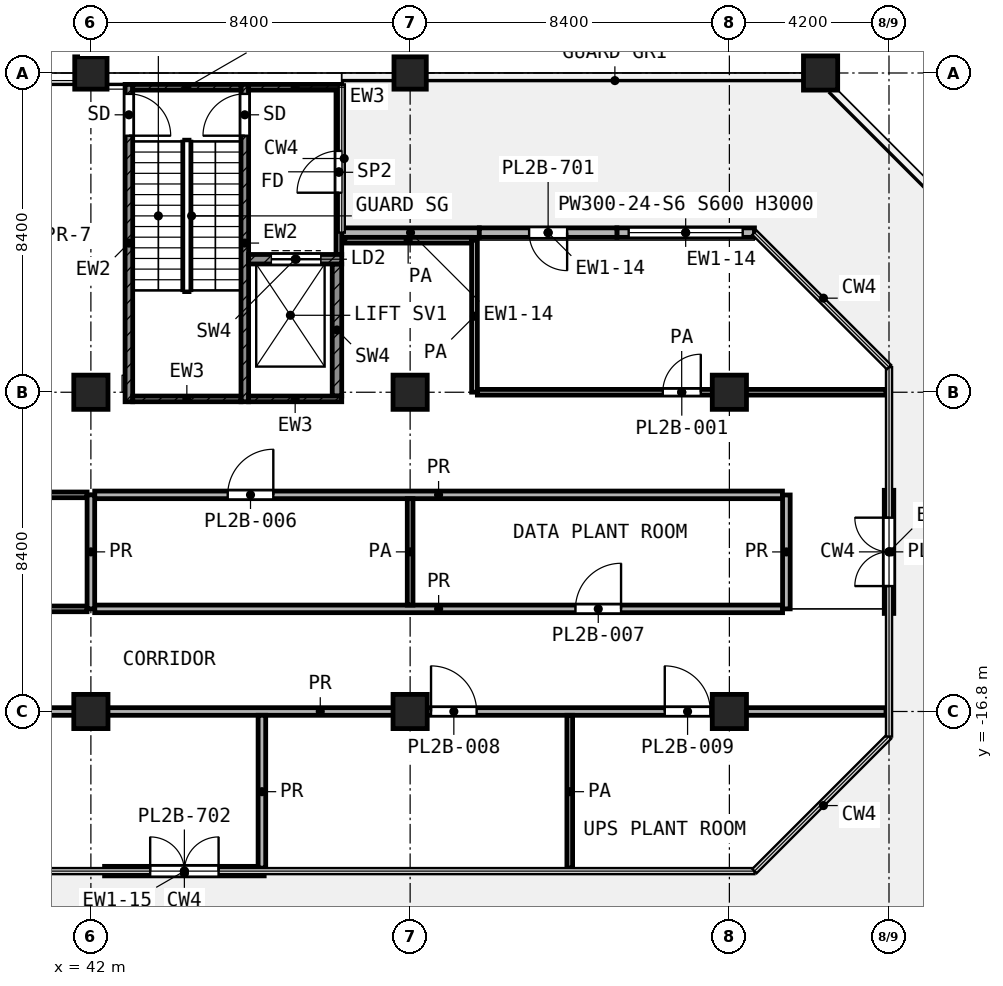
"""IFC4 building model, lengths in metres.
Left out: names, types, materials, properties, quantities, classifications, styles, units other than length and angle.
Written with IfcOpenShell. Run it as: python <this file> out.ifc"""

import sys

from ifc_helpers import new_model, si_unit, direction, frame, frame_2d, origin, origin_2d, place, context, subcontext, project, spatial, rectangle, extrude, element, fill, save


model = new_model("IFC4")
c1 = context("Model", 3, precision=1e-05, world=origin(), true_north=direction((0.0, 1.0)))
c2 = subcontext(c1, "Body", "Model", "MODEL_VIEW")
j1 = project(units=[si_unit("LENGTHUNIT", "METRE"), si_unit("PLANEANGLEUNIT", "RADIAN")], contexts=[c1])
p1 = place(None, origin())
s1 = spatial("IfcSite", under=j1, at=p1, CompositionType="ELEMENT")
p2 = place(p1, origin())
s2 = spatial("IfcBuilding", under=s1, at=p2, CompositionType="ELEMENT")
p3 = place(p2, frame((0.0, 0.0, 213.0)))
s3 = spatial("IfcBuildingStorey", under=s2, at=p3, CompositionType="ELEMENT", Elevation=213.0)
for number, where, z_axis, x_axis in (
    (1, (42.0, 0.0, 0.0), (0.0, 0.0, 1.0), (1.0, 0.0, 0.0)),
    (2, (50.4, 0.0, 0.0), (0.0, 0.0, 1.0), (1.0, 0.0, 0.0)),
):
    element("IfcColumn", number, at=place(p3, frame(where, z_axis=z_axis, x_axis=x_axis)), inside=s3, PredefinedType="COLUMN", context=c2, shape_type="SweptSolid", body=[
        extrude(rectangle(XDim=0.85, YDim=0.85, at=origin_2d()), origin(), (0.0, 0.0, 1.0), 5.0),
    ])
for number, where, z_axis, x_axis in (
    (3, (61.2, 0.0, 0.0), (0.0, 0.0, 1.0), (1.0, 0.0, 0.0)),
    (4, (42.0, -8.4, 0.0), (0.0, 0.0, 1.0), (1.0, 0.0, 0.0)),
    (5, (50.4, -8.4, 0.0), (0.0, 0.0, 1.0), (1.0, 0.0, 0.0)),
    (6, (58.8, -8.4, 0.0), (0.0, 0.0, 1.0), (1.0, 0.0, 0.0)),
    (7, (42.0, -16.8, 0.0), (0.0, 0.0, 1.0), (1.0, 0.0, 0.0)),
    (8, (50.4, -16.8, 0.0), (0.0, 0.0, 1.0), (1.0, 0.0, 0.0)),
    (9, (58.8, -16.8, 0.0), (0.0, 0.0, 1.0), (1.0, 0.0, 0.0)),
):
    element("IfcColumn", number, at=place(p3, frame(where, z_axis=z_axis, x_axis=x_axis)), inside=s3, PredefinedType="COLUMN", context=c2, shape_type="SweptSolid", body=[
        extrude(rectangle(XDim=0.9, YDim=0.9, at=origin_2d()), origin(), (0.0, 0.0, 1.0), 5.0),
    ])
p4 = place(p3, frame((42.36, -21.0, 0.0), z_axis=(0.0, 0.0, 1.0), x_axis=(1.0, 0.0, 0.0)))
e10 = element("IfcWall", 10, at=p4, inside=s3, PredefinedType="SOLIDWALL", context=c2, shape_type="SweptSolid", body=[
    extrude(rectangle(XDim=4.2, YDim=0.25, at=frame_2d((2.1, 0.0))), origin(), (0.0, 0.0, 1.0), 4.24),
])
p5 = place(p4, frame((1.2, 0.0, 0.0)))
e11 = element("IfcOpeningElement", 11, at=p5, cuts=e10, PredefinedType="OPENING", context=c2, shape_type="SweptSolid", body=[
    extrude(rectangle(XDim=1.8, YDim=2.1, at=frame_2d((0.9, 1.05))), frame((0.0, 0.135, 0.0), z_axis=(0.0, -1.0, 0.0), x_axis=(1.0, 0.0, 0.0)), (0.0, 0.0, 1.0), 0.27),
])
p6 = place(p3, frame((63.001, -14.22, 0.0), z_axis=(0.0, 0.0, 1.0), x_axis=(0.0, 1.0, 0.0)))
e12 = element("IfcWall", 12, at=p6, inside=s3, PredefinedType="SOLIDWALL", context=c2, shape_type="SweptSolid", body=[
    extrude(rectangle(XDim=3.24, YDim=0.25, at=frame_2d((1.62, 0.0))), origin(), (0.0, 0.0, 1.0), 4.24),
])
p7 = place(p6, frame((0.72, 0.0, 0.0)))
e13 = element("IfcOpeningElement", 13, at=p7, cuts=e12, PredefinedType="OPENING", context=c2, shape_type="SweptSolid", body=[
    extrude(rectangle(XDim=1.8, YDim=2.1, at=frame_2d((0.9, 1.05))), frame((0.0, 0.135, 0.0), z_axis=(0.0, -1.0, 0.0), x_axis=(1.0, 0.0, 0.0)), (0.0, 0.0, 1.0), 0.27),
])
p8 = place(p3, frame((59.46, -4.2, 0.0), z_axis=(0.0, 0.0, 1.0), x_axis=(-1.0, 0.0, 0.0)))
e14 = element("IfcWall", 14, at=p8, inside=s3, PredefinedType="SOLIDWALL", context=c2, shape_type="SweptSolid", body=[
    extrude(rectangle(XDim=3.62, YDim=0.25, at=frame_2d((1.81, 0.0))), origin(), (0.0, 0.0, 1.0), 4.4),
])
p9 = place(p8, frame((0.31, 0.0, 0.6)))
e15 = element("IfcOpeningElement", 15, at=p9, cuts=e14, PredefinedType="OPENING", context=c2, shape_type="SweptSolid", body=[
    extrude(rectangle(XDim=3.0, YDim=2.4, at=frame_2d((1.5, 1.2))), frame((0.0, 0.135, 0.0), z_axis=(0.0, -1.0, 0.0), x_axis=(1.0, 0.0, 0.0)), (0.0, 0.0, 1.0), 0.27),
])
p10 = place(p3, frame((55.84, -4.2, 0.0), z_axis=(0.0, 0.0, 1.0), x_axis=(-1.0, 0.0, 0.0)))
e16 = element("IfcWall", 16, at=p10, inside=s3, PredefinedType="SOLIDWALL", context=c2, shape_type="SweptSolid", body=[
    extrude(rectangle(XDim=3.62, YDim=0.25, at=frame_2d((1.81, 0.0))), origin(), (0.0, 0.0, 1.0), 4.4),
])
p11 = place(p10, frame((1.309, 0.0, 0.0)))
e17 = element("IfcOpeningElement", 17, at=p11, cuts=e16, PredefinedType="OPENING", context=c2, shape_type="SweptSolid", body=[
    extrude(rectangle(XDim=1.0, YDim=2.1, at=frame_2d((0.5, 1.05))), frame((0.0, 0.135, 0.0), z_axis=(0.0, -1.0, 0.0), x_axis=(1.0, 0.0, 0.0)), (0.0, 0.0, 1.0), 0.27),
])
p12 = place(p3, frame((52.221, -4.2, 0.0), z_axis=(0.0, 0.0, 1.0), x_axis=(-1.0, 0.0, 0.0)))
e18 = element("IfcWall", 18, at=p12, inside=s3, PredefinedType="SOLIDWALL", context=c2, shape_type="SweptSolid", body=[
    extrude(rectangle(XDim=3.62, YDim=0.25, at=frame_2d((1.81, 0.0))), origin(), (0.0, 0.0, 1.0), 4.4),
])
p13 = place(p3, frame((43.0, -8.65, 0.0), z_axis=(0.0, 0.0, 1.0), x_axis=(0.0, 1.0, 0.0)))
e19 = element("IfcWall", 19, at=p13, inside=s3, PredefinedType="SHEAR", context=c2, shape_type="SweptSolid", body=[
    extrude(rectangle(XDim=8.35, YDim=0.2, at=frame_2d((4.175, 0.0))), origin(), (0.0, 0.0, 1.0), 4.4),
])
p14 = place(p13, frame((7.0, 0.0, 0.0)))
e20 = element("IfcOpeningElement", 20, at=p14, cuts=e19, PredefinedType="OPENING", context=c2, shape_type="SweptSolid", body=[
    extrude(rectangle(XDim=1.1, YDim=2.1, at=frame_2d((0.55, 1.05))), frame((0.0, 0.11, 0.0), z_axis=(0.0, -1.0, 0.0), x_axis=(1.0, 0.0, 0.0)), (0.0, 0.0, 1.0), 0.22),
])
p15 = place(p3, frame((46.05, -8.65, 0.0), z_axis=(0.0, 0.0, 1.0), x_axis=(0.0, 1.0, 0.0)))
e21 = element("IfcWall", 21, at=p15, inside=s3, PredefinedType="SHEAR", context=c2, shape_type="SweptSolid", body=[
    extrude(rectangle(XDim=8.35, YDim=0.2, at=frame_2d((4.175, 0.0))), origin(), (0.0, 0.0, 1.0), 4.4),
])
p16 = place(p15, frame((7.0, 0.0, 0.0)))
e22 = element("IfcOpeningElement", 22, at=p16, cuts=e21, PredefinedType="OPENING", context=c2, shape_type="SweptSolid", body=[
    extrude(rectangle(XDim=1.1, YDim=2.1, at=frame_2d((0.55, 1.05))), frame((0.0, 0.11, 0.0), z_axis=(0.0, -1.0, 0.0), x_axis=(1.0, 0.0, 0.0)), (0.0, 0.0, 1.0), 0.22),
])
p17 = place(p3, frame((43.1, -0.375, 0.0), z_axis=(0.0, 0.0, 1.0), x_axis=(1.0, 0.0, 0.0)))
e23 = element("IfcWall", 23, at=p17, inside=s3, PredefinedType="SHEAR", context=c2, shape_type="SweptSolid", body=[
    extrude(rectangle(XDim=2.85, YDim=0.15, at=frame_2d((1.425, 0.0))), origin(), (0.0, 0.0, 1.0), 4.4),
])
p18 = place(p3, frame((46.15, -0.375, 0.0), z_axis=(0.0, 0.0, 1.0), x_axis=(1.0, 0.0, 0.0)))
e24 = element("IfcWall", 24, at=p18, inside=s3, PredefinedType="SHEAR", context=c2, shape_type="SweptSolid", body=[
    extrude(rectangle(XDim=2.45, YDim=0.15, at=frame_2d((1.225, 0.0))), origin(), (0.0, 0.0, 1.0), 4.4),
])
p19 = place(p3, frame((43.1, -8.575, 0.0), z_axis=(0.0, 0.0, 1.0), x_axis=(1.0, 0.0, 0.0)))
e25 = element("IfcWall", 25, at=p19, inside=s3, PredefinedType="SHEAR", context=c2, shape_type="SweptSolid", body=[
    extrude(rectangle(XDim=2.85, YDim=0.15, at=frame_2d((1.425, 0.0))), origin(), (0.0, 0.0, 1.0), 4.4),
])
p20 = place(p3, frame((46.15, -8.575, 0.0), z_axis=(0.0, 0.0, 1.0), x_axis=(1.0, 0.0, 0.0)))
e26 = element("IfcWall", 26, at=p20, inside=s3, PredefinedType="SHEAR", context=c2, shape_type="SweptSolid", body=[
    extrude(rectangle(XDim=2.45, YDim=0.15, at=frame_2d((1.225, 0.0))), origin(), (0.0, 0.0, 1.0), 4.4),
])
p21 = place(p3, frame((46.15, -4.9, 0.0), z_axis=(0.0, 0.0, 1.0), x_axis=(1.0, 0.0, 0.0)))
e27 = element("IfcWall", 27, at=p21, inside=s3, PredefinedType="SHEAR", context=c2, shape_type="SweptSolid", body=[
    extrude(rectangle(XDim=2.45, YDim=0.25, at=frame_2d((1.225, 0.0))), origin(), (0.0, 0.0, 1.0), 4.4),
])
p22 = place(p21, frame((0.6, 0.0, 0.0)))
e28 = element("IfcOpeningElement", 28, at=p22, cuts=e27, PredefinedType="OPENING", context=c2, shape_type="SweptSolid", body=[
    extrude(rectangle(XDim=1.3, YDim=2.1, at=frame_2d((0.65, 1.05))), frame((0.0, 0.135, 0.0), z_axis=(0.0, -1.0, 0.0), x_axis=(1.0, 0.0, 0.0)), (0.0, 0.0, 1.0), 0.27),
])
p23 = place(p3, frame((48.475, -8.5, 0.0), z_axis=(0.0, 0.0, 1.0), x_axis=(0.0, 1.0, 0.0)))
e29 = element("IfcWall", 29, at=p23, inside=s3, PredefinedType="SHEAR", context=c2, shape_type="SweptSolid", body=[
    extrude(rectangle(XDim=3.475, YDim=0.25, at=frame_2d((1.738, 0.0))), origin(), (0.0, 0.0, 1.0), 4.4),
])
p24 = place(p3, frame((48.525, -4.775, 0.0), z_axis=(0.0, 0.0, 1.0), x_axis=(0.0, 1.0, 0.0)))
e30 = element("IfcWall", 30, at=p24, inside=s3, PredefinedType="PARTITIONING", context=c2, shape_type="SweptSolid", body=[
    extrude(rectangle(XDim=4.325, YDim=0.15, at=frame_2d((2.163, 0.0))), origin(), (0.0, 0.0, 1.0), 4.4),
])
p25 = place(p24, frame((1.625, 0.0, 0.0)))
e31 = element("IfcOpeningElement", 31, at=p25, cuts=e30, PredefinedType="OPENING", context=c2, shape_type="SweptSolid", body=[
    extrude(rectangle(XDim=1.1, YDim=2.1, at=frame_2d((0.55, 1.05))), frame((0.0, 0.085, 0.0), z_axis=(0.0, -1.0, 0.0), x_axis=(1.0, 0.0, 0.0)), (0.0, 0.0, 1.0), 0.17),
])
p26 = place(p3, frame((29.475, -14.1, 0.0), z_axis=(0.0, 0.0, 1.0), x_axis=(1.0, 0.0, 0.0)))
e32 = element("IfcWall", 32, at=p26, inside=s3, PredefinedType="PARTITIONING", context=c2, shape_type="SweptSolid", body=[
    extrude(rectangle(XDim=12.425, YDim=0.15, at=frame_2d((6.212, 0.0))), origin(), (0.0, 0.0, 1.0), 4.4),
])
p27 = place(p3, frame((29.478, -11.1, 0.0), z_axis=(0.0, 0.0, 1.0), x_axis=(1.0, 0.0, 0.0)))
e33 = element("IfcWall", 33, at=p27, inside=s3, PredefinedType="PARTITIONING", context=c2, shape_type="SweptSolid", body=[
    extrude(rectangle(XDim=12.422, YDim=0.15, at=frame_2d((6.211, 0.0))), origin(), (0.0, 0.0, 1.0), 4.4),
])
p28 = place(p27, frame((5.723, 0.0, 0.0)))
e34 = element("IfcOpeningElement", 34, at=p28, cuts=e33, PredefinedType="OPENING", context=c2, shape_type="SweptSolid", body=[
    extrude(rectangle(XDim=1.0, YDim=2.1, at=frame_2d((0.5, 1.05))), frame((0.0, 0.085, 0.0), z_axis=(0.0, -1.0, 0.0), x_axis=(1.0, 0.0, 0.0)), (0.0, 0.0, 1.0), 0.17),
])
p29 = place(p3, frame((52.169, -8.4, 0.0), z_axis=(0.0, 0.0, 1.0), x_axis=(1.0, 0.0, 0.0)))
e35 = element("IfcWall", 35, at=p29, inside=s3, PredefinedType="PARTITIONING", context=c2, shape_type="SweptSolid", body=[
    extrude(rectangle(XDim=10.752, YDim=0.15, at=frame_2d((5.376, 0.0))), origin(), (0.0, 0.0, 1.0), 4.4),
])
p30 = place(p29, frame((4.879, 0.0, 0.0)))
e36 = element("IfcOpeningElement", 36, at=p30, cuts=e35, PredefinedType="OPENING", context=c2, shape_type="SweptSolid", body=[
    extrude(rectangle(XDim=1.0, YDim=2.1, at=frame_2d((0.5, 1.05))), frame((0.0, 0.085, 0.0), z_axis=(0.0, -1.0, 0.0), x_axis=(1.0, 0.0, 0.0)), (0.0, 0.0, 1.0), 0.17),
])
p31 = place(p3, frame((48.68, -4.4, 0.0), z_axis=(0.0, 0.0, 1.0), x_axis=(1.0, 0.0, 0.0)))
e37 = element("IfcWall", 37, at=p31, inside=s3, PredefinedType="PARTITIONING", context=c2, shape_type="SweptSolid", body=[
    extrude(rectangle(XDim=3.336, YDim=0.15, at=frame_2d((1.668, 0.0))), origin(), (0.0, 0.0, 1.0), 4.4),
])
p32 = place(p3, frame((50.4, -14.0, 0.0), z_axis=(0.0, 0.0, 1.0), x_axis=(0.0, 1.0, 0.0)))
e38 = element("IfcWall", 38, at=p32, inside=s3, PredefinedType="PARTITIONING", context=c2, shape_type="SweptSolid", body=[
    extrude(rectangle(XDim=2.8, YDim=0.15, at=frame_2d((1.4, 0.0))), origin(), (0.0, 0.0, 1.0), 4.4),
])
p33 = place(p3, frame((52.093, -8.398, 0.0), z_axis=(0.0, 0.0, 1.0), x_axis=(0.0, 1.0, 0.0)))
e39 = element("IfcWall", 39, at=p33, inside=s3, PredefinedType="PARTITIONING", context=c2, shape_type="SweptSolid", body=[
    extrude(rectangle(XDim=3.997, YDim=0.15, at=frame_2d((1.999, 0.0))), origin(), (0.0, 0.0, 1.0), 4.4),
])
p34 = place(p3, frame((54.6, -20.92, 0.0), z_axis=(0.0, 0.0, 1.0), x_axis=(0.0, 1.0, 0.0)))
e40 = element("IfcWall", 40, at=p34, inside=s3, PredefinedType="PARTITIONING", context=c2, shape_type="SweptSolid", body=[
    extrude(rectangle(XDim=4.02, YDim=0.15, at=frame_2d((2.01, 0.0))), origin(), (0.0, 0.0, 1.0), 4.4),
])
p35 = place(p3, frame((33.15, -16.8, 0.0), z_axis=(0.0, 0.0, 1.0), x_axis=(1.0, 0.0, 0.0)))
e41 = element("IfcWall", 41, at=p35, inside=s3, PredefinedType="PARTITIONING", context=c2, shape_type="SweptSolid", body=[
    extrude(rectangle(XDim=29.771, YDim=0.2, at=frame_2d((14.885, 0.0))), origin(), (0.0, 0.0, 1.0), 4.4),
])
p36 = place(p35, frame((4.2, 0.0, 0.0)))
e42 = element("IfcOpeningElement", 42, at=p36, cuts=e41, PredefinedType="OPENING", context=c2, shape_type="SweptSolid", body=[
    extrude(rectangle(XDim=1.2, YDim=2.1, at=frame_2d((0.6, 1.05))), frame((0.0, 0.11, 0.0), z_axis=(0.0, -1.0, 0.0), x_axis=(1.0, 0.0, 0.0)), (0.0, 0.0, 1.0), 0.22),
])
p37 = place(p35, frame((17.8, 0.0, 0.0)))
e43 = element("IfcOpeningElement", 43, at=p37, cuts=e41, PredefinedType="OPENING", context=c2, shape_type="SweptSolid", body=[
    extrude(rectangle(XDim=1.2, YDim=2.1, at=frame_2d((0.6, 1.05))), frame((0.0, 0.11, 0.0), z_axis=(0.0, -1.0, 0.0), x_axis=(1.0, 0.0, 0.0)), (0.0, 0.0, 1.0), 0.22),
])
p38 = place(p35, frame((23.95, 0.0, 0.0)))
e44 = element("IfcOpeningElement", 44, at=p38, cuts=e41, PredefinedType="OPENING", context=c2, shape_type="SweptSolid", body=[
    extrude(rectangle(XDim=1.2, YDim=2.1, at=frame_2d((0.6, 1.05))), frame((0.0, 0.11, 0.0), z_axis=(0.0, -1.0, 0.0), x_axis=(1.0, 0.0, 0.0)), (0.0, 0.0, 1.0), 0.22),
])
p39 = place(p3, frame((42.1, -14.1, 0.0), z_axis=(0.0, 0.0, 1.0), x_axis=(1.0, 0.0, 0.0)))
e45 = element("IfcWall", 45, at=p39, inside=s3, PredefinedType="PARTITIONING", context=c2, shape_type="SweptSolid", body=[
    extrude(rectangle(XDim=18.1, YDim=0.2, at=frame_2d((9.05, 0.0))), origin(), (0.0, 0.0, 1.0), 4.4),
])
p40 = place(p39, frame((12.65, 0.0, 0.0)))
e46 = element("IfcOpeningElement", 46, at=p40, cuts=e45, PredefinedType="OPENING", context=c2, shape_type="SweptSolid", body=[
    extrude(rectangle(XDim=1.2, YDim=2.1, at=frame_2d((0.6, 1.05))), frame((0.0, 0.11, 0.0), z_axis=(0.0, -1.0, 0.0), x_axis=(1.0, 0.0, 0.0)), (0.0, 0.0, 1.0), 0.22),
])
p41 = place(p3, frame((42.1, -11.1, 0.0), z_axis=(0.0, 0.0, 1.0), x_axis=(1.0, 0.0, 0.0)))
e47 = element("IfcWall", 47, at=p41, inside=s3, PredefinedType="PARTITIONING", context=c2, shape_type="SweptSolid", body=[
    extrude(rectangle(XDim=18.097, YDim=0.2, at=frame_2d((9.048, 0.0))), origin(), (0.0, 0.0, 1.0), 4.4),
])
p42 = place(p41, frame((3.5, 0.0, 0.0)))
e48 = element("IfcOpeningElement", 48, at=p42, cuts=e47, PredefinedType="OPENING", context=c2, shape_type="SweptSolid", body=[
    extrude(rectangle(XDim=1.2, YDim=2.1, at=frame_2d((0.6, 1.05))), frame((0.0, 0.11, 0.0), z_axis=(0.0, -1.0, 0.0), x_axis=(1.0, 0.0, 0.0)), (0.0, 0.0, 1.0), 0.22),
])
p43 = place(p3, frame((42.0, -14.1, 0.0), z_axis=(0.0, 0.0, 1.0), x_axis=(0.0, 1.0, 0.0)))
e49 = element("IfcWall", 49, at=p43, inside=s3, PredefinedType="PARTITIONING", context=c2, shape_type="SweptSolid", body=[
    extrude(rectangle(XDim=3.0, YDim=0.2, at=frame_2d((1.5, 0.0))), origin(), (0.0, 0.0, 1.0), 4.4),
])
p44 = place(p3, frame((46.5, -20.92, 0.0), z_axis=(0.0, 0.0, 1.0), x_axis=(0.0, 1.0, 0.0)))
e50 = element("IfcWall", 50, at=p44, inside=s3, PredefinedType="PARTITIONING", context=c2, shape_type="SweptSolid", body=[
    extrude(rectangle(XDim=4.02, YDim=0.2, at=frame_2d((2.01, 0.0))), origin(), (0.0, 0.0, 1.0), 4.4),
])
p45 = place(p3, frame((60.3, -14.1, 0.0), z_axis=(0.0, 0.0, 1.0), x_axis=(0.0, 1.0, 0.0)))
e51 = element("IfcWall", 51, at=p45, inside=s3, PredefinedType="PARTITIONING", context=c2, shape_type="SweptSolid", body=[
    extrude(rectangle(XDim=2.997, YDim=0.2, at=frame_2d((1.499, 0.0))), origin(), (0.0, 0.0, 1.0), 4.4),
])
p46 = place(p5, origin())
e52 = element("IfcDoor", 52, at=p46, inside=s3, OperationType="DOUBLE_DOOR_SINGLE_SWING", PredefinedType="DOOR", context=c2, shape_type="SweptSolid", body=[
    extrude(rectangle(XDim=1.8, YDim=2.1, at=frame_2d((0.9, 1.05))), frame((0.0, 0.025, 0.0), z_axis=(0.0, -1.0, 0.0), x_axis=(1.0, 0.0, 0.0)), (0.0, 0.0, 1.0), 0.05),
])
fill(e11, e52)
p47 = place(p7, origin())
e53 = element("IfcDoor", 53, at=p47, inside=s3, OperationType="DOUBLE_DOOR_SINGLE_SWING", PredefinedType="DOOR", context=c2, shape_type="SweptSolid", body=[
    extrude(rectangle(XDim=1.8, YDim=2.1, at=frame_2d((0.9, 1.05))), frame((0.0, 0.025, 0.0), z_axis=(0.0, -1.0, 0.0), x_axis=(1.0, 0.0, 0.0)), (0.0, 0.0, 1.0), 0.05),
])
fill(e13, e53)
p48 = place(p9, origin())
e54 = element("IfcWindow", 54, at=p48, inside=s3, PartitioningType="SINGLE_PANEL", PredefinedType="WINDOW", context=c2, shape_type="SweptSolid", body=[
    extrude(rectangle(XDim=3.0, YDim=2.4, at=frame_2d((1.5, 1.2))), frame((0.0, 0.03, 0.0), z_axis=(0.0, -1.0, 0.0), x_axis=(1.0, 0.0, 0.0)), (0.0, 0.0, 1.0), 0.06),
])
fill(e15, e54)
p49 = place(p11, origin())
e55 = element("IfcDoor", 55, at=p49, inside=s3, OperationType="SINGLE_SWING_LEFT", PredefinedType="DOOR", context=c2, shape_type="SweptSolid", body=[
    extrude(rectangle(XDim=1.0, YDim=2.1, at=frame_2d((0.5, 1.05))), frame((0.0, 0.025, 0.0), z_axis=(0.0, -1.0, 0.0), x_axis=(1.0, 0.0, 0.0)), (0.0, 0.0, 1.0), 0.05),
])
fill(e17, e55)
p50 = place(p14, frame((1.1, 0.0, 0.0), z_axis=(0.0, 0.0, 1.0), x_axis=(-1.0, 0.0, 0.0)))
e56 = element("IfcDoor", 56, at=p50, inside=s3, OperationType="SINGLE_SWING_LEFT", PredefinedType="DOOR", context=c2, shape_type="SweptSolid", body=[
    extrude(rectangle(XDim=1.1, YDim=2.1, at=frame_2d((0.55, 1.05))), frame((0.0, 0.025, 0.0), z_axis=(0.0, -1.0, 0.0), x_axis=(1.0, 0.0, 0.0)), (0.0, 0.0, 1.0), 0.05),
])
fill(e20, e56)
p51 = place(p16, origin())
e57 = element("IfcDoor", 57, at=p51, inside=s3, OperationType="SINGLE_SWING_LEFT", PredefinedType="DOOR", context=c2, shape_type="SweptSolid", body=[
    extrude(rectangle(XDim=1.1, YDim=2.1, at=frame_2d((0.55, 1.05))), frame((0.0, 0.025, 0.0), z_axis=(0.0, -1.0, 0.0), x_axis=(1.0, 0.0, 0.0)), (0.0, 0.0, 1.0), 0.05),
])
fill(e22, e57)
p52 = place(p22, origin())
e58 = element("IfcDoor", 58, at=p52, inside=s3, OperationType="DOUBLE_DOOR_SLIDING", PredefinedType="DOOR", context=c2, shape_type="SweptSolid", body=[
    extrude(rectangle(XDim=1.3, YDim=2.1, at=frame_2d((0.65, 1.05))), frame((0.0, 0.025, 0.0), z_axis=(0.0, -1.0, 0.0), x_axis=(1.0, 0.0, 0.0)), (0.0, 0.0, 1.0), 0.05),
])
fill(e28, e58)
p53 = place(p25, origin())
e59 = element("IfcDoor", 59, at=p53, inside=s3, OperationType="SINGLE_SWING_LEFT", PredefinedType="DOOR", context=c2, shape_type="SweptSolid", body=[
    extrude(rectangle(XDim=1.1, YDim=2.1, at=frame_2d((0.55, 1.05))), frame((0.0, 0.025, 0.0), z_axis=(0.0, -1.0, 0.0), x_axis=(1.0, 0.0, 0.0)), (0.0, 0.0, 1.0), 0.05),
])
fill(e31, e59)
p54 = place(p30, origin())
e60 = element("IfcDoor", 60, at=p54, inside=s3, OperationType="SINGLE_SWING_RIGHT", PredefinedType="DOOR", context=c2, shape_type="SweptSolid", body=[
    extrude(rectangle(XDim=1.0, YDim=2.1, at=frame_2d((0.5, 1.05))), frame((0.0, 0.025, 0.0), z_axis=(0.0, -1.0, 0.0), x_axis=(1.0, 0.0, 0.0)), (0.0, 0.0, 1.0), 0.05),
])
fill(e36, e60)
p55 = place(p42, origin())
e61 = element("IfcDoor", 61, at=p55, inside=s3, OperationType="SINGLE_SWING_RIGHT", PredefinedType="DOOR", context=c2, shape_type="SweptSolid", body=[
    extrude(rectangle(XDim=1.2, YDim=2.1, at=frame_2d((0.6, 1.05))), frame((0.0, 0.025, 0.0), z_axis=(0.0, -1.0, 0.0), x_axis=(1.0, 0.0, 0.0)), (0.0, 0.0, 1.0), 0.05),
])
fill(e48, e61)
p56 = place(p40, origin())
e62 = element("IfcDoor", 62, at=p56, inside=s3, OperationType="SINGLE_SWING_RIGHT", PredefinedType="DOOR", context=c2, shape_type="SweptSolid", body=[
    extrude(rectangle(XDim=1.2, YDim=2.1, at=frame_2d((0.6, 1.05))), frame((0.0, 0.025, 0.0), z_axis=(0.0, -1.0, 0.0), x_axis=(1.0, 0.0, 0.0)), (0.0, 0.0, 1.0), 0.05),
])
fill(e46, e62)
p57 = place(p37, origin())
e63 = element("IfcDoor", 63, at=p57, inside=s3, OperationType="SINGLE_SWING_LEFT", PredefinedType="DOOR", context=c2, shape_type="SweptSolid", body=[
    extrude(rectangle(XDim=1.2, YDim=2.1, at=frame_2d((0.6, 1.05))), frame((0.0, 0.025, 0.0), z_axis=(0.0, -1.0, 0.0), x_axis=(1.0, 0.0, 0.0)), (0.0, 0.0, 1.0), 0.05),
])
fill(e43, e63)
p58 = place(p38, origin())
e64 = element("IfcDoor", 64, at=p58, inside=s3, OperationType="SINGLE_SWING_LEFT", PredefinedType="DOOR", context=c2, shape_type="SweptSolid", body=[
    extrude(rectangle(XDim=1.2, YDim=2.1, at=frame_2d((0.6, 1.05))), frame((0.0, 0.025, 0.0), z_axis=(0.0, -1.0, 0.0), x_axis=(1.0, 0.0, 0.0)), (0.0, 0.0, 1.0), 0.05),
])
fill(e44, e64)
save(model, sys.argv[1])
